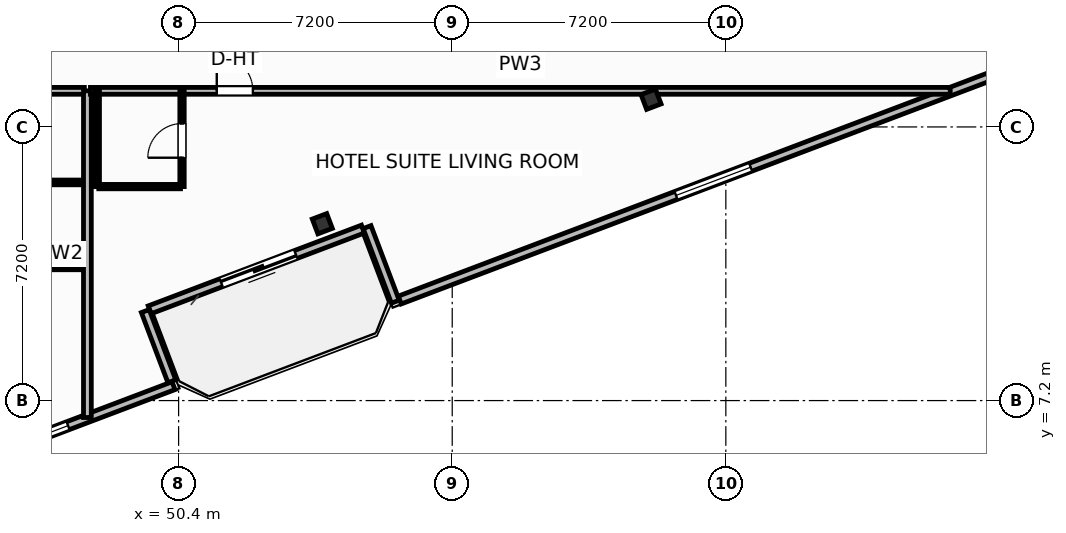
"""IFC4 building model, lengths in metres.
Left out: names, types, materials, properties, quantities, classifications, styles, units other than length and angle.
Written with IfcOpenShell. Run it as: python <this file> out.ifc"""

import sys

from ifc_helpers import new_model, si_unit, direction, frame, frame_2d, origin, origin_2d, place, context, subcontext, project, spatial, rectangle, i_section, extrude, element, fill, save


model = new_model("IFC4")
c1 = context("Model", 3, precision=1e-05, world=origin(), true_north=direction((0.0, 1.0)))
c2 = subcontext(c1, "Body", "Model", "MODEL_VIEW")
j1 = project(units=[si_unit("LENGTHUNIT", "METRE"), si_unit("PLANEANGLEUNIT", "RADIAN")], contexts=[c1])
p1 = place(None, origin())
s1 = spatial("IfcSite", under=j1, at=p1, CompositionType="ELEMENT")
p2 = place(p1, origin())
s2 = spatial("IfcBuilding", under=s1, at=p2, CompositionType="ELEMENT")
p3 = place(p2, frame((0.0, 0.0, 223.8)))
s3 = spatial("IfcBuildingStorey", under=s2, at=p3, CompositionType="ELEMENT", Elevation=223.8)
for number, where, z_axis, x_axis in (
    (1, (54.181, 11.853, 0.0), (0.0, 0.0, 1.0), (0.935, 0.354, 0.0)),
    (2, (62.832, 15.128, 0.0), (0.0, 0.0, 1.0), (0.935, 0.354, 0.0)),
):
    element("IfcColumn", number, at=place(p3, frame(where, z_axis=z_axis, x_axis=x_axis)), inside=s3, PredefinedType="COLUMN", context=c2, shape_type="SweptSolid", body=[
        extrude(i_section(OverallWidth=0.406, OverallDepth=0.416, WebThickness=0.03, FlangeThickness=0.048, FilletRadius=0.025, at=origin_2d()), origin(), (0.0, 0.0, 1.0), 3.7),
    ])
p4 = place(p3, frame((55.25, 11.713, 0.0), z_axis=(0.0, 0.0, 1.0), x_axis=(-0.935227640088, -0.354046976001, 0.0)))
e3 = element("IfcWall", 3, at=p4, inside=s3, PredefinedType="SOLIDWALL", context=c2, shape_type="SweptSolid", body=[
    extrude(rectangle(XDim=6.0, YDim=0.22, at=frame_2d((3.0, 0.0))), origin(), (0.0, 0.0, 1.0), 2.73),
])
p5 = place(p4, frame((1.888, 0.0, 0.0)))
e4 = element("IfcOpeningElement", 4, at=p5, cuts=e3, PredefinedType="OPENING", context=c2, shape_type="SweptSolid", body=[
    extrude(rectangle(XDim=2.1, YDim=2.3, at=frame_2d((1.05, 1.15))), frame((0.0, 0.12, 0.0), z_axis=(0.0, -1.0, 0.0), x_axis=(1.0, 0.0, 0.0)), (0.0, 0.0, 1.0), 0.24),
])
p6 = place(p3, frame((42.752, 4.746, 0.0), z_axis=(0.0, 0.0, 1.0), x_axis=(0.935216926991, 0.354075273733, 0.0)))
e5 = element("IfcWall", 5, at=p6, inside=s3, PredefinedType="SOLIDWALL", context=c2, shape_type="SweptSolid", body=[
    extrude(rectangle(XDim=8.035, YDim=0.22, at=frame_2d((4.018, 0.0))), origin(), (0.0, 0.0, 1.0), 2.73),
])
p7 = place(p6, frame((2.968, 0.0, 0.8)))
e6 = element("IfcOpeningElement", 6, at=p7, cuts=e5, PredefinedType="OPENING", context=c2, shape_type="SweptSolid", body=[
    extrude(rectangle(XDim=2.1, YDim=1.75, at=frame_2d((1.05, 0.875))), frame((0.0, 0.12, 0.0), z_axis=(0.0, -1.0, 0.0), x_axis=(1.0, 0.0, 0.0)), (0.0, 0.0, 1.0), 0.24),
])
p8 = place(p3, frame((50.223, 7.708, 0.0), z_axis=(0.0, 0.0, 1.0), x_axis=(-0.354020680661, 0.935237594232, 0.0)))
e7 = element("IfcWall", 7, at=p8, inside=s3, PredefinedType="SOLIDWALL", context=c2, shape_type="SweptSolid", body=[
    extrude(rectangle(XDim=1.975, YDim=0.22, at=frame_2d((0.988, 0.0))), origin(), (0.0, 0.0, 1.0), 2.73),
])
p9 = place(p3, frame((55.359, 11.764, 0.0), z_axis=(0.0, 0.0, 1.0), x_axis=(0.354026782794, -0.935235284334, 0.0)))
e8 = element("IfcWall", 8, at=p9, inside=s3, PredefinedType="SOLIDWALL", context=c2, shape_type="SweptSolid", body=[
    extrude(rectangle(XDim=2.1, YDim=0.22, at=frame_2d((1.05, 0.0))), origin(), (0.0, 0.0, 1.0), 2.73),
])
p10 = place(p3, frame((56.219, 9.845, 0.0), z_axis=(0.0, 0.0, 1.0), x_axis=(0.935225601791, 0.354052360188, 0.0)))
e9 = element("IfcWall", 9, at=p10, inside=s3, PredefinedType="SOLIDWALL", context=c2, shape_type="SweptSolid", body=[
    extrude(rectangle(XDim=17.647, YDim=0.22, at=frame_2d((8.824, 0.0))), origin(), (0.0, 0.0, 1.0), 2.73),
])
p11 = place(p10, frame((7.774, 0.0, 0.8)))
e10 = element("IfcOpeningElement", 10, at=p11, cuts=e9, PredefinedType="OPENING", context=c2, shape_type="SweptSolid", body=[
    extrude(rectangle(XDim=2.1, YDim=1.75, at=frame_2d((1.05, 0.875))), frame((0.0, 0.12, 0.0), z_axis=(0.0, -1.0, 0.0), x_axis=(1.0, 0.0, 0.0)), (0.0, 0.0, 1.0), 0.24),
])
p12 = place(p3, frame((35.58, 15.35, 0.0), z_axis=(0.0, 0.0, 1.0), x_axis=(1.0, 0.0, 0.0)))
e11 = element("IfcWall", 11, at=p12, inside=s3, PredefinedType="PARTITIONING", context=c2, shape_type="SweptSolid", body=[
    extrude(rectangle(XDim=12.34, YDim=0.18, at=frame_2d((6.17, 0.0))), origin(), (0.0, 0.0, 1.0), 3.45),
])
p13 = place(p12, frame((3.235, 0.0, 0.0)))
e12 = element("IfcOpeningElement", 12, at=p13, cuts=e11, PredefinedType="OPENING", context=c2, shape_type="SweptSolid", body=[
    extrude(rectangle(XDim=1.0, YDim=2.2, at=frame_2d((0.5, 1.1))), frame((0.0, 0.1, 0.0), z_axis=(0.0, -1.0, 0.0), x_axis=(1.0, 0.0, 0.0)), (0.0, 0.0, 1.0), 0.2),
])
p14 = place(p3, frame((43.19, 12.94, 0.0), z_axis=(0.0, 0.0, 1.0), x_axis=(1.0, 0.0, 0.0)))
e13 = element("IfcWall", 13, at=p14, inside=s3, PredefinedType="PARTITIONING", context=c2, shape_type="SweptSolid", body=[
    extrude(rectangle(XDim=4.73, YDim=0.125, at=frame_2d((2.365, 0.0))), origin(), (0.0, 0.0, 1.0), 3.018),
])
p15 = place(p3, frame((43.19, 10.7, 0.0), z_axis=(0.0, 0.0, 1.0), x_axis=(1.0, 0.0, 0.0)))
e14 = element("IfcWall", 14, at=p15, inside=s3, PredefinedType="PARTITIONING", context=c2, shape_type="SweptSolid", body=[
    extrude(rectangle(XDim=4.73, YDim=0.115, at=frame_2d((2.365, 0.0))), origin(), (0.0, 0.0, 1.0), 3.45),
])
p16 = place(p3, frame((48.0, 6.754, 0.0), z_axis=(0.0, 0.0, 1.0), x_axis=(0.0, 1.0, 0.0)))
e15 = element("IfcWall", 15, at=p16, inside=s3, PredefinedType="PARTITIONING", context=c2, shape_type="SweptSolid", body=[
    extrude(rectangle(XDim=8.596, YDim=0.205, at=frame_2d((4.298, 0.0))), origin(), (0.0, 0.0, 1.0), 3.45),
])
p17 = place(p3, frame((48.08, 15.35, 0.0), z_axis=(0.0, 0.0, 1.0), x_axis=(1.0, 0.0, 0.0)))
e16 = element("IfcWall", 16, at=p17, inside=s3, PredefinedType="PARTITIONING", context=c2, shape_type="SweptSolid", body=[
    extrude(rectangle(XDim=22.624, YDim=0.18, at=frame_2d((11.312, 0.0))), origin(), (0.0, 0.0, 1.0), 3.45),
])
p18 = place(p17, frame((3.324, 0.0, 0.0)))
e17 = element("IfcOpeningElement", 17, at=p18, cuts=e16, PredefinedType="OPENING", context=c2, shape_type="SweptSolid", body=[
    extrude(rectangle(XDim=0.95, YDim=2.15, at=frame_2d((0.475, 1.075))), frame((0.0, 0.1, 0.0), z_axis=(0.0, -1.0, 0.0), x_axis=(1.0, 0.0, 0.0)), (0.0, 0.0, 1.0), 0.2),
])
p19 = place(p3, frame((48.3, 12.83, 0.0), z_axis=(0.0, 0.0, 1.0), x_axis=(1.0, 0.0, 0.0)))
e18 = element("IfcWall", 18, at=p19, inside=s3, PredefinedType="PARTITIONING", context=c2, shape_type="SweptSolid", body=[
    extrude(rectangle(XDim=2.15, YDim=0.115, at=frame_2d((1.075, 0.0))), origin(), (0.0, 0.0, 1.0), 3.45),
])
p20 = place(p3, frame((50.49, 12.83, 0.0), z_axis=(0.0, 0.0, 1.0), x_axis=(0.0, 1.0, 0.0)))
e19 = element("IfcWall", 19, at=p20, inside=s3, PredefinedType="PARTITIONING", context=c2, shape_type="SweptSolid", body=[
    extrude(rectangle(XDim=2.52, YDim=0.115, at=frame_2d((1.26, 0.0))), origin(), (0.0, 0.0, 1.0), 3.45),
])
p21 = place(p20, frame((0.76, 0.0, 0.0)))
e20 = element("IfcOpeningElement", 20, at=p21, cuts=e19, PredefinedType="OPENING", context=c2, shape_type="SweptSolid", body=[
    extrude(rectangle(XDim=0.9, YDim=2.05, at=frame_2d((0.45, 1.025))), frame((0.0, 0.067, 0.0), z_axis=(0.0, -1.0, 0.0), x_axis=(1.0, 0.0, 0.0)), (0.0, 0.0, 1.0), 0.135),
])
p22 = place(p3, frame((48.26, 12.83, 0.0), z_axis=(0.0, 0.0, 1.0), x_axis=(0.0, 1.0, 0.0)))
e21 = element("IfcWall", 21, at=p22, inside=s3, PredefinedType="PARTITIONING", context=c2, shape_type="SweptSolid", body=[
    extrude(rectangle(XDim=2.52, YDim=0.115, at=frame_2d((1.26, 0.0))), origin(), (0.0, 0.0, 1.0), 3.45),
])
p23 = place(p5, origin())
e22 = element("IfcDoor", 22, at=p23, inside=s3, OperationType="SLIDING_TO_LEFT", PredefinedType="DOOR", context=c2, shape_type="SweptSolid", body=[
    extrude(rectangle(XDim=2.1, YDim=2.3, at=frame_2d((1.05, 1.15))), frame((0.0, 0.025, 0.0), z_axis=(0.0, -1.0, 0.0), x_axis=(1.0, 0.0, 0.0)), (0.0, 0.0, 1.0), 0.05),
])
fill(e4, e22)
p24 = place(p7, origin())
e23 = element("IfcWindow", 23, at=p24, inside=s3, PartitioningType="SINGLE_PANEL", PredefinedType="WINDOW", context=c2, shape_type="SweptSolid", body=[
    extrude(rectangle(XDim=2.1, YDim=1.75, at=frame_2d((1.05, 0.875))), frame((0.0, 0.03, 0.0), z_axis=(0.0, -1.0, 0.0), x_axis=(1.0, 0.0, 0.0)), (0.0, 0.0, 1.0), 0.06),
])
fill(e6, e23)
p25 = place(p11, origin())
e24 = element("IfcWindow", 24, at=p25, inside=s3, PartitioningType="SINGLE_PANEL", PredefinedType="WINDOW", context=c2, shape_type="SweptSolid", body=[
    extrude(rectangle(XDim=2.1, YDim=1.75, at=frame_2d((1.05, 0.875))), frame((0.0, 0.03, 0.0), z_axis=(0.0, -1.0, 0.0), x_axis=(1.0, 0.0, 0.0)), (0.0, 0.0, 1.0), 0.06),
])
fill(e10, e24)
p26 = place(p18, origin())
e25 = element("IfcDoor", 25, at=p26, inside=s3, OperationType="SINGLE_SWING_LEFT", PredefinedType="DOOR", context=c2, shape_type="SweptSolid", body=[
    extrude(rectangle(XDim=0.95, YDim=2.15, at=frame_2d((0.475, 1.075))), frame((0.0, 0.025, 0.0), z_axis=(0.0, -1.0, 0.0), x_axis=(1.0, 0.0, 0.0)), (0.0, 0.0, 1.0), 0.05),
])
fill(e17, e25)
p27 = place(p21, origin())
e26 = element("IfcDoor", 26, at=p27, inside=s3, OperationType="SINGLE_SWING_LEFT", PredefinedType="DOOR", context=c2, shape_type="SweptSolid", body=[
    extrude(rectangle(XDim=0.9, YDim=2.05, at=frame_2d((0.45, 1.025))), frame((0.0, 0.025, 0.0), z_axis=(0.0, -1.0, 0.0), x_axis=(1.0, 0.0, 0.0)), (0.0, 0.0, 1.0), 0.05),
])
fill(e20, e26)
save(model, sys.argv[1])
